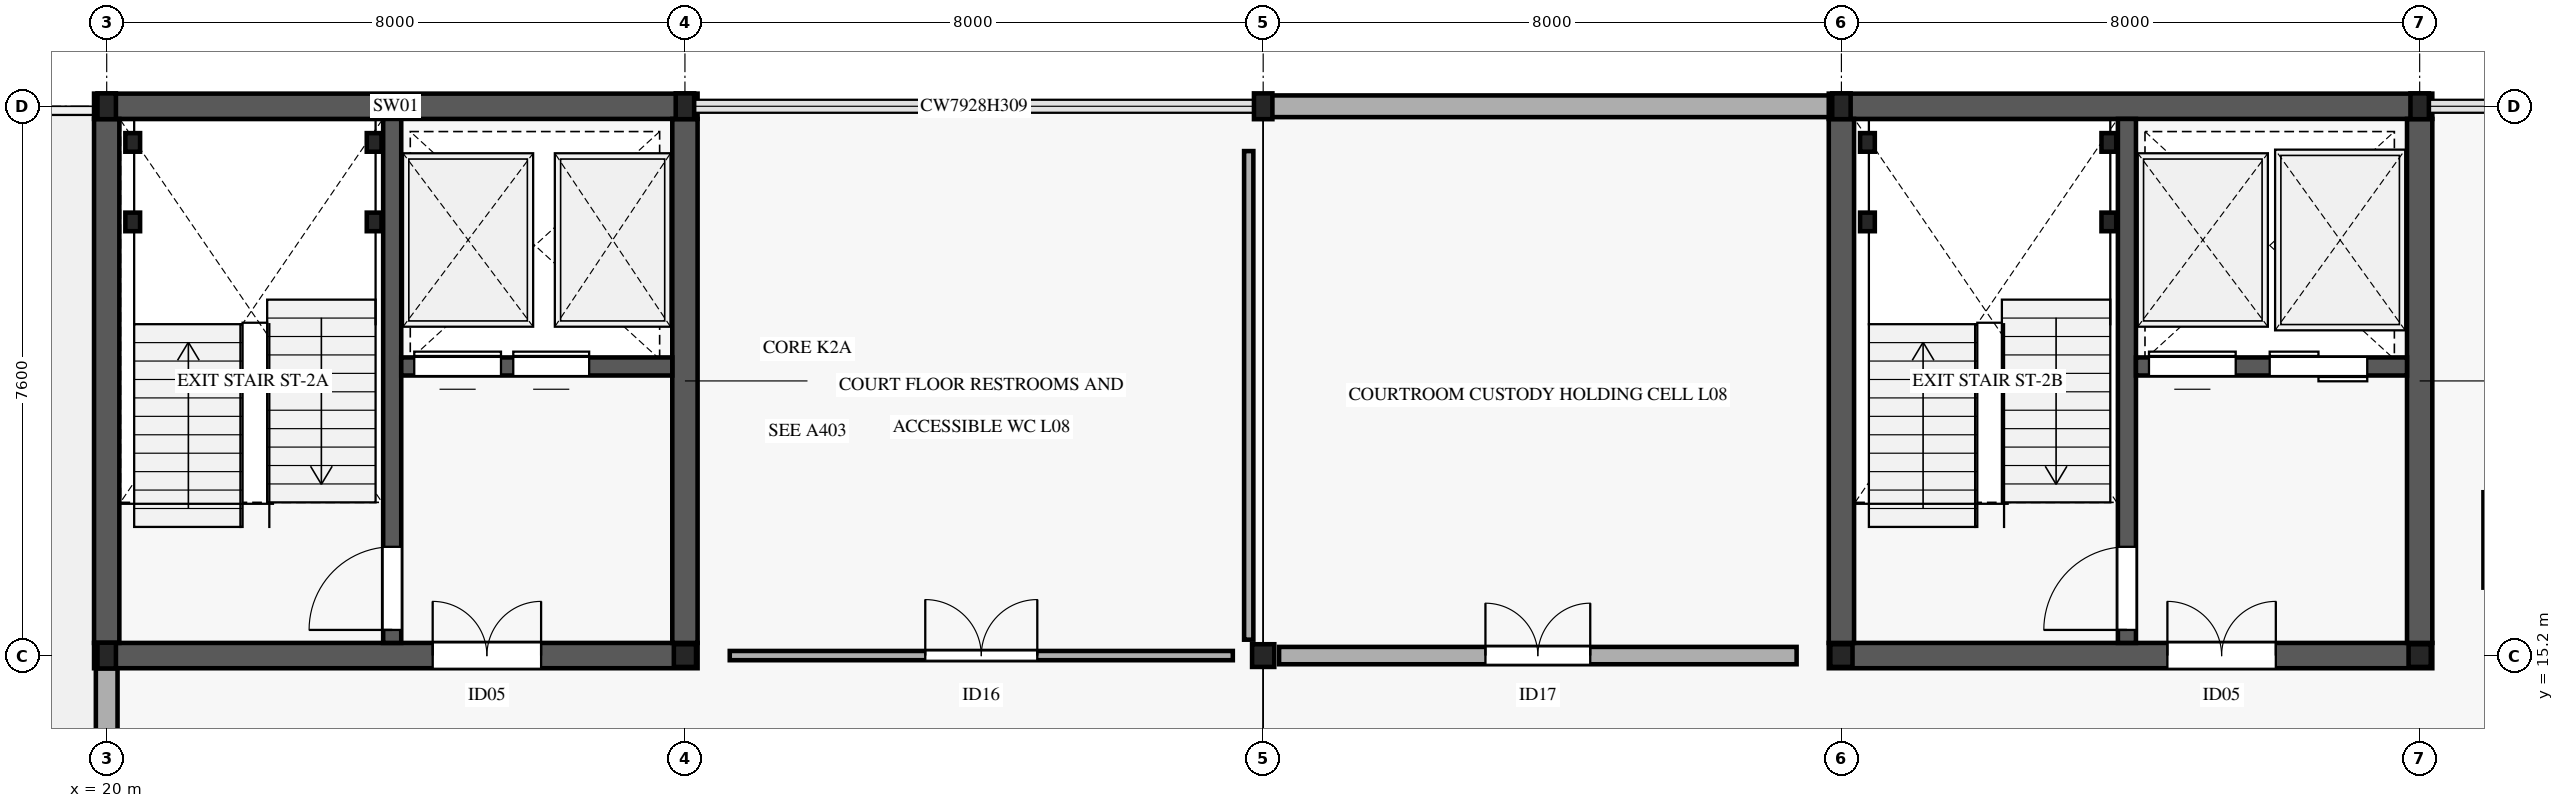
"""IFC4 building model, lengths in metres.
Left out: names, types, materials, properties, quantities, classifications, styles, units other than length and angle.
Written with IfcOpenShell. Run it as: python <this file> out.ifc"""

import sys

from ifc_helpers import new_model, si_unit, direction, frame, frame_2d, origin, origin_2d, place, context, subcontext, project, spatial, rectangle, i_section, extrude, element, fill, save


model = new_model("IFC4")
c1 = context("Model", 3, precision=1e-05, world=origin(), true_north=direction((0.0, 1.0)))
c2 = subcontext(c1, "Body", "Model", "MODEL_VIEW")
j1 = project(units=[si_unit("LENGTHUNIT", "METRE"), si_unit("PLANEANGLEUNIT", "RADIAN")], contexts=[c1])
p1 = place(None, origin())
s1 = spatial("IfcSite", under=j1, at=p1, CompositionType="ELEMENT")
p2 = place(p1, origin())
s2 = spatial("IfcBuilding", under=s1, at=p2, CompositionType="ELEMENT")
p3 = place(p2, frame((0.0, 0.0, 37.8)))
s3 = spatial("IfcBuildingStorey", under=s2, at=p3, CompositionType="ELEMENT", Elevation=37.8)
for number, where, z_axis, x_axis in (
    (1, (20.0, 15.2, 0.0), (0.0, 0.0, 1.0), (1.0, 0.0, 0.0)),
    (2, (20.0, 22.8, 0.0), (0.0, 0.0, 1.0), (1.0, 0.0, 0.0)),
):
    element("IfcColumn", number, at=place(p3, frame(where, z_axis=z_axis, x_axis=x_axis)), inside=s3, PredefinedType="COLUMN", context=c2, shape_type="SweptSolid", body=[
        extrude(i_section(OverallWidth=0.255, OverallDepth=0.357, WebThickness=0.01, FlangeThickness=0.018, FilletRadius=0.015, at=origin_2d()), origin(), (0.0, 0.0, 1.0), 4.0),
    ])
p4 = place(p3, frame((28.0, 15.2, 0.0), z_axis=(0.0, 0.0, 1.0), x_axis=(1.0, 0.0, 0.0)))
e3 = element("IfcColumn", 3, at=p4, inside=s3, PredefinedType="COLUMN", context=c2, shape_type="SweptSolid", body=[
    extrude(i_section(OverallWidth=0.307, OverallDepth=0.314, WebThickness=0.012, FlangeThickness=0.019, FilletRadius=0.015, at=origin_2d()), origin(), (0.0, 0.0, 1.0), 4.0),
])
p5 = place(p3, frame((28.0, 22.8, 0.0), z_axis=(0.0, 0.0, 1.0), x_axis=(1.0, 0.0, 0.0)))
e4 = element("IfcColumn", 4, at=p5, inside=s3, PredefinedType="COLUMN", context=c2, shape_type="SweptSolid", body=[
    extrude(i_section(OverallWidth=0.255, OverallDepth=0.357, WebThickness=0.01, FlangeThickness=0.018, FilletRadius=0.015, at=origin_2d()), origin(), (0.0, 0.0, 1.0), 4.0),
])
p6 = place(p3, frame((36.0, 15.2, 0.0), z_axis=(0.0, 0.0, 1.0), x_axis=(1.0, 0.0, 0.0)))
e5 = element("IfcColumn", 5, at=p6, inside=s3, PredefinedType="COLUMN", context=c2, shape_type="SweptSolid", body=[
    extrude(i_section(OverallWidth=0.307, OverallDepth=0.314, WebThickness=0.012, FlangeThickness=0.019, FilletRadius=0.015, at=origin_2d()), origin(), (0.0, 0.0, 1.0), 4.0),
])
p7 = place(p3, frame((36.0, 22.8, 0.0), z_axis=(0.0, 0.0, 1.0), x_axis=(1.0, 0.0, 0.0)))
e6 = element("IfcColumn", 6, at=p7, inside=s3, PredefinedType="COLUMN", context=c2, shape_type="SweptSolid", body=[
    extrude(i_section(OverallWidth=0.255, OverallDepth=0.357, WebThickness=0.01, FlangeThickness=0.018, FilletRadius=0.015, at=origin_2d()), origin(), (0.0, 0.0, 1.0), 4.0),
])
p8 = place(p3, frame((44.0, 15.2, 0.0), z_axis=(0.0, 0.0, 1.0), x_axis=(1.0, 0.0, 0.0)))
e7 = element("IfcColumn", 7, at=p8, inside=s3, PredefinedType="COLUMN", context=c2, shape_type="SweptSolid", body=[
    extrude(i_section(OverallWidth=0.307, OverallDepth=0.314, WebThickness=0.012, FlangeThickness=0.019, FilletRadius=0.015, at=origin_2d()), origin(), (0.0, 0.0, 1.0), 4.0),
])
p9 = place(p3, frame((44.0, 22.8, 0.0), z_axis=(0.0, 0.0, 1.0), x_axis=(1.0, 0.0, 0.0)))
e8 = element("IfcColumn", 8, at=p9, inside=s3, PredefinedType="COLUMN", context=c2, shape_type="SweptSolid", body=[
    extrude(i_section(OverallWidth=0.255, OverallDepth=0.357, WebThickness=0.01, FlangeThickness=0.018, FilletRadius=0.015, at=origin_2d()), origin(), (0.0, 0.0, 1.0), 4.0),
])
p10 = place(p3, frame((52.0, 15.2, 0.0), z_axis=(0.0, 0.0, 1.0), x_axis=(1.0, 0.0, 0.0)))
e9 = element("IfcColumn", 9, at=p10, inside=s3, PredefinedType="COLUMN", context=c2, shape_type="SweptSolid", body=[
    extrude(i_section(OverallWidth=0.307, OverallDepth=0.314, WebThickness=0.012, FlangeThickness=0.019, FilletRadius=0.015, at=origin_2d()), origin(), (0.0, 0.0, 1.0), 4.0),
])
p11 = place(p3, frame((52.0, 22.8, 0.0), z_axis=(0.0, 0.0, 1.0), x_axis=(1.0, 0.0, 0.0)))
e10 = element("IfcColumn", 10, at=p11, inside=s3, PredefinedType="COLUMN", context=c2, shape_type="SweptSolid", body=[
    extrude(i_section(OverallWidth=0.255, OverallDepth=0.357, WebThickness=0.01, FlangeThickness=0.018, FilletRadius=0.015, at=origin_2d()), origin(), (0.0, 0.0, 1.0), 4.0),
])
p12 = place(p3, frame((20.0, 7.58, 0.0), z_axis=(0.0, 0.0, 1.0), x_axis=(0.0, 1.0, 0.0)))
e11 = element("IfcWall", 11, at=p12, inside=s3, PredefinedType="STANDARD", context=c2, shape_type="SweptSolid", body=[
    extrude(rectangle(XDim=7.64, YDim=0.3, at=frame_2d((3.82, 0.0))), origin(), (0.0, 0.0, 1.0), 3.06),
])
p13 = place(p12, frame((2.195, 0.0, 0.75)))
e12 = element("IfcOpeningElement", 12, at=p13, cuts=e11, PredefinedType="OPENING", context=c2, shape_type="SweptSolid", body=[
    extrude(rectangle(XDim=3.25, YDim=1.55, at=frame_2d((1.625, 0.775))), frame((0.0, 0.16, 0.0), z_axis=(0.0, -1.0, 0.0), x_axis=(1.0, 0.0, 0.0)), (0.0, 0.0, 1.0), 0.32),
])
p14 = place(p3, frame((35.98, 22.8, 0.0), z_axis=(0.0, 0.0, 1.0), x_axis=(1.0, 0.0, 0.0)))
e13 = element("IfcWall", 13, at=p14, inside=s3, PredefinedType="STANDARD", context=c2, shape_type="SweptSolid", body=[
    extrude(rectangle(XDim=8.04, YDim=0.3, at=frame_2d((4.02, 0.0))), origin(), (0.0, 0.0, 1.0), 3.06),
])
p15 = place(p3, frame((52.94, 17.46, 0.0), z_axis=(0.0, 0.0, 1.0), x_axis=(0.0, -1.0, 0.0)))
e14 = element("IfcWall", 14, at=p15, inside=s3, PredefinedType="PARTITIONING", context=c2, shape_type="SweptSolid", body=[
    extrude(rectangle(XDim=1.32, YDim=0.115, at=frame_2d((0.66, 0.0))), origin(), (0.0, 0.0, 1.0), 3.15),
])
p16 = place(p3, frame((19.825, 15.2, 0.0), z_axis=(0.0, 0.0, 1.0), x_axis=(1.0, 0.0, 0.0)))
e15 = element("IfcWall", 15, at=p16, inside=s3, PredefinedType="SHEAR", context=c2, shape_type="SweptSolid", body=[
    extrude(rectangle(XDim=8.35, YDim=0.35, at=frame_2d((4.175, 0.0))), origin(), (0.0, 0.0, 1.0), 3.99),
])
p17 = place(p16, frame((4.685, 0.0, 0.0)))
e16 = element("IfcOpeningElement", 16, at=p17, cuts=e15, PredefinedType="OPENING", context=c2, shape_type="SweptSolid", body=[
    extrude(rectangle(XDim=1.5, YDim=2.2, at=frame_2d((0.75, 1.1))), frame((0.0, 0.185, 0.0), z_axis=(0.0, -1.0, 0.0), x_axis=(1.0, 0.0, 0.0)), (0.0, 0.0, 1.0), 0.37),
])
p18 = place(p3, frame((19.825, 22.8, 0.0), z_axis=(0.0, 0.0, 1.0), x_axis=(1.0, 0.0, 0.0)))
e17 = element("IfcWall", 17, at=p18, inside=s3, PredefinedType="SHEAR", context=c2, shape_type="SweptSolid", body=[
    extrude(rectangle(XDim=8.35, YDim=0.35, at=frame_2d((4.175, 0.0))), origin(), (0.0, 0.0, 1.0), 3.99),
])
for number, where, z_axis, x_axis in (
    (18, (20.0, 15.375, 0.0), (0.0, 0.0, 1.0), (0.0, 1.0, 0.0)),
    (19, (28.0, 15.375, 0.0), (0.0, 0.0, 1.0), (0.0, 1.0, 0.0)),
):
    element("IfcWall", number, at=place(p3, frame(where, z_axis=z_axis, x_axis=x_axis)), inside=s3, PredefinedType="SHEAR", context=c2, shape_type="SweptSolid", body=[
        extrude(rectangle(XDim=7.25, YDim=0.35, at=frame_2d((3.625, 0.0))), origin(), (0.0, 0.0, 1.0), 3.99),
    ])
p19 = place(p3, frame((23.95, 15.375, 0.0), z_axis=(0.0, 0.0, 1.0), x_axis=(0.0, 1.0, 0.0)))
e20 = element("IfcWall", 20, at=p19, inside=s3, PredefinedType="SHEAR", context=c2, shape_type="SweptSolid", body=[
    extrude(rectangle(XDim=7.25, YDim=0.25, at=frame_2d((3.625, 0.0))), origin(), (0.0, 0.0, 1.0), 3.99),
])
p20 = place(p19, frame((0.18, 0.0, 0.0)))
e21 = element("IfcOpeningElement", 21, at=p20, cuts=e20, PredefinedType="OPENING", context=c2, shape_type="SweptSolid", body=[
    extrude(rectangle(XDim=1.15, YDim=2.2, at=frame_2d((0.575, 1.1))), frame((0.0, 0.135, 0.0), z_axis=(0.0, -1.0, 0.0), x_axis=(1.0, 0.0, 0.0)), (0.0, 0.0, 1.0), 0.27),
])
p21 = place(p3, frame((24.075, 19.2, 0.0), z_axis=(0.0, 0.0, 1.0), x_axis=(1.0, 0.0, 0.0)))
e22 = element("IfcWall", 22, at=p21, inside=s3, PredefinedType="SHEAR", context=c2, shape_type="SweptSolid", body=[
    extrude(rectangle(XDim=3.75, YDim=0.25, at=frame_2d((1.875, 0.0))), origin(), (0.0, 0.0, 1.0), 3.99),
])
p22 = place(p21, frame((0.18, 0.0, 0.0)))
e23 = element("IfcOpeningElement", 23, at=p22, cuts=e22, PredefinedType="OPENING", context=c2, shape_type="SweptSolid", body=[
    extrude(rectangle(XDim=1.2, YDim=2.2, at=frame_2d((0.6, 1.1))), frame((0.0, 0.135, 0.0), z_axis=(0.0, -1.0, 0.0), x_axis=(1.0, 0.0, 0.0)), (0.0, 0.0, 1.0), 0.27),
])
p23 = place(p21, frame((1.55, 0.0, 0.0)))
e24 = element("IfcOpeningElement", 24, at=p23, cuts=e22, PredefinedType="OPENING", context=c2, shape_type="SweptSolid", body=[
    extrude(rectangle(XDim=1.05, YDim=2.2, at=frame_2d((0.525, 1.1))), frame((0.0, 0.135, 0.0), z_axis=(0.0, -1.0, 0.0), x_axis=(1.0, 0.0, 0.0)), (0.0, 0.0, 1.0), 0.27),
])
for number, where, z_axis, x_axis in (
    (25, (20.36, 21.2, 0.0), (0.0, 0.0, 1.0), (1.0, 0.0, 0.0)),
    (26, (23.7, 21.2, 0.0), (0.0, 0.0, 1.0), (1.0, 0.0, 0.0)),
    (27, (20.36, 22.3, 0.0), (0.0, 0.0, 1.0), (1.0, 0.0, 0.0)),
    (28, (23.7, 22.3, 0.0), (0.0, 0.0, 1.0), (1.0, 0.0, 0.0)),
):
    element("IfcColumn", number, at=place(p3, frame(where, z_axis=z_axis, x_axis=x_axis)), inside=s3, PredefinedType="COLUMN", context=c2, shape_type="SweptSolid", body=[
        extrude(i_section(OverallWidth=0.204, OverallDepth=0.257, WebThickness=0.009, FlangeThickness=0.016, FilletRadius=0.013, at=origin_2d()), origin(), (0.0, 0.0, 1.0), 4.195),
    ])
p24 = place(p3, frame((43.825, 15.2, 0.0), z_axis=(0.0, 0.0, 1.0), x_axis=(1.0, 0.0, 0.0)))
e29 = element("IfcWall", 29, at=p24, inside=s3, PredefinedType="SHEAR", context=c2, shape_type="SweptSolid", body=[
    extrude(rectangle(XDim=8.35, YDim=0.35, at=frame_2d((4.175, 0.0))), origin(), (0.0, 0.0, 1.0), 3.99),
])
p25 = place(p24, frame((4.685, 0.0, 0.0)))
e30 = element("IfcOpeningElement", 30, at=p25, cuts=e29, PredefinedType="OPENING", context=c2, shape_type="SweptSolid", body=[
    extrude(rectangle(XDim=1.5, YDim=2.2, at=frame_2d((0.75, 1.1))), frame((0.0, 0.185, 0.0), z_axis=(0.0, -1.0, 0.0), x_axis=(1.0, 0.0, 0.0)), (0.0, 0.0, 1.0), 0.37),
])
p26 = place(p3, frame((43.825, 22.8, 0.0), z_axis=(0.0, 0.0, 1.0), x_axis=(1.0, 0.0, 0.0)))
e31 = element("IfcWall", 31, at=p26, inside=s3, PredefinedType="SHEAR", context=c2, shape_type="SweptSolid", body=[
    extrude(rectangle(XDim=8.35, YDim=0.35, at=frame_2d((4.175, 0.0))), origin(), (0.0, 0.0, 1.0), 3.99),
])
for number, where, z_axis, x_axis in (
    (32, (44.0, 15.375, 0.0), (0.0, 0.0, 1.0), (0.0, 1.0, 0.0)),
    (33, (52.0, 15.375, 0.0), (0.0, 0.0, 1.0), (0.0, 1.0, 0.0)),
):
    element("IfcWall", number, at=place(p3, frame(where, z_axis=z_axis, x_axis=x_axis)), inside=s3, PredefinedType="SHEAR", context=c2, shape_type="SweptSolid", body=[
        extrude(rectangle(XDim=7.25, YDim=0.35, at=frame_2d((3.625, 0.0))), origin(), (0.0, 0.0, 1.0), 3.99),
    ])
p27 = place(p3, frame((47.95, 15.375, 0.0), z_axis=(0.0, 0.0, 1.0), x_axis=(0.0, 1.0, 0.0)))
e34 = element("IfcWall", 34, at=p27, inside=s3, PredefinedType="SHEAR", context=c2, shape_type="SweptSolid", body=[
    extrude(rectangle(XDim=7.25, YDim=0.25, at=frame_2d((3.625, 0.0))), origin(), (0.0, 0.0, 1.0), 3.99),
])
p28 = place(p27, frame((0.18, 0.0, 0.0)))
e35 = element("IfcOpeningElement", 35, at=p28, cuts=e34, PredefinedType="OPENING", context=c2, shape_type="SweptSolid", body=[
    extrude(rectangle(XDim=1.15, YDim=2.2, at=frame_2d((0.575, 1.1))), frame((0.0, 0.135, 0.0), z_axis=(0.0, -1.0, 0.0), x_axis=(1.0, 0.0, 0.0)), (0.0, 0.0, 1.0), 0.27),
])
p29 = place(p3, frame((48.075, 19.2, 0.0), z_axis=(0.0, 0.0, 1.0), x_axis=(1.0, 0.0, 0.0)))
e36 = element("IfcWall", 36, at=p29, inside=s3, PredefinedType="SHEAR", context=c2, shape_type="SweptSolid", body=[
    extrude(rectangle(XDim=3.75, YDim=0.25, at=frame_2d((1.875, 0.0))), origin(), (0.0, 0.0, 1.0), 3.99),
])
p30 = place(p29, frame((0.18, 0.0, 0.0)))
e37 = element("IfcOpeningElement", 37, at=p30, cuts=e36, PredefinedType="OPENING", context=c2, shape_type="SweptSolid", body=[
    extrude(rectangle(XDim=1.2, YDim=2.2, at=frame_2d((0.6, 1.1))), frame((0.0, 0.135, 0.0), z_axis=(0.0, -1.0, 0.0), x_axis=(1.0, 0.0, 0.0)), (0.0, 0.0, 1.0), 0.27),
])
p31 = place(p29, frame((1.85, 0.0, 0.0)))
e38 = element("IfcOpeningElement", 38, at=p31, cuts=e36, PredefinedType="OPENING", context=c2, shape_type="SweptSolid", body=[
    extrude(rectangle(XDim=1.35, YDim=2.2, at=frame_2d((0.675, 1.1))), frame((0.0, 0.135, 0.0), z_axis=(0.0, -1.0, 0.0), x_axis=(1.0, 0.0, 0.0)), (0.0, 0.0, 1.0), 0.27),
])
for number, where, z_axis, x_axis in (
    (39, (44.36, 21.2, 0.0), (0.0, 0.0, 1.0), (1.0, 0.0, 0.0)),
    (40, (47.7, 21.2, 0.0), (0.0, 0.0, 1.0), (1.0, 0.0, 0.0)),
    (41, (44.36, 22.3, 0.0), (0.0, 0.0, 1.0), (1.0, 0.0, 0.0)),
    (42, (47.7, 22.3, 0.0), (0.0, 0.0, 1.0), (1.0, 0.0, 0.0)),
):
    element("IfcColumn", number, at=place(p3, frame(where, z_axis=z_axis, x_axis=x_axis)), inside=s3, PredefinedType="COLUMN", context=c2, shape_type="SweptSolid", body=[
        extrude(i_section(OverallWidth=0.204, OverallDepth=0.257, WebThickness=0.009, FlangeThickness=0.016, FilletRadius=0.013, at=origin_2d()), origin(), (0.0, 0.0, 1.0), 4.195),
    ])
p32 = place(p3, frame((28.62, 15.2, 0.0), z_axis=(0.0, 0.0, 1.0), x_axis=(1.0, 0.0, 0.0)))
e43 = element("IfcWall", 43, at=p32, inside=s3, PredefinedType="PARTITIONING", context=c2, shape_type="SweptSolid", body=[
    extrude(rectangle(XDim=6.96, YDim=0.128, at=frame_2d((3.48, 0.0))), origin(), (0.0, 0.0, 1.0), 2.85),
])
p33 = place(p32, frame((2.705, 0.0, 0.0)))
e44 = element("IfcOpeningElement", 44, at=p33, cuts=e43, PredefinedType="OPENING", context=c2, shape_type="SweptSolid", body=[
    extrude(rectangle(XDim=1.55, YDim=2.3, at=frame_2d((0.775, 1.15))), frame((0.0, 0.074, 0.0), z_axis=(0.0, -1.0, 0.0), x_axis=(1.0, 0.0, 0.0)), (0.0, 0.0, 1.0), 0.148),
])
p34 = place(p3, frame((35.8, 15.42, 0.0), z_axis=(0.0, 0.0, 1.0), x_axis=(0.0, 1.0, 0.0)))
e45 = element("IfcWall", 45, at=p34, inside=s3, PredefinedType="PARTITIONING", context=c2, shape_type="SweptSolid", body=[
    extrude(rectangle(XDim=6.76, YDim=0.128, at=frame_2d((3.38, 0.0))), origin(), (0.0, 0.0, 1.0), 2.85),
])
p35 = place(p3, frame((36.22, 15.2, 0.0), z_axis=(0.0, 0.0, 1.0), x_axis=(1.0, 0.0, 0.0)))
e46 = element("IfcWall", 46, at=p35, inside=s3, PredefinedType="PARTITIONING", context=c2, shape_type="SweptSolid", body=[
    extrude(rectangle(XDim=7.16, YDim=0.24, at=frame_2d((3.58, 0.0))), origin(), (0.0, 0.0, 1.0), 2.85),
])
p36 = place(p35, frame((2.855, 0.0, 0.0)))
e47 = element("IfcOpeningElement", 47, at=p36, cuts=e46, PredefinedType="OPENING", context=c2, shape_type="SweptSolid", body=[
    extrude(rectangle(XDim=1.45, YDim=2.25, at=frame_2d((0.725, 1.125))), frame((0.0, 0.13, 0.0), z_axis=(0.0, -1.0, 0.0), x_axis=(1.0, 0.0, 0.0)), (0.0, 0.0, 1.0), 0.26),
])
p37 = place(p20, origin())
e48 = element("IfcDoor", 48, at=p37, inside=s3, OperationType="SINGLE_SWING_LEFT", PredefinedType="DOOR", context=c2, shape_type="SweptSolid", body=[
    extrude(rectangle(XDim=1.15, YDim=2.2, at=frame_2d((0.575, 1.1))), frame((0.0, 0.025, 0.0), z_axis=(0.0, -1.0, 0.0), x_axis=(1.0, 0.0, 0.0)), (0.0, 0.0, 1.0), 0.05),
])
fill(e21, e48)
p38 = place(p17, origin())
e49 = element("IfcDoor", 49, at=p38, inside=s3, OperationType="DOUBLE_DOOR_SINGLE_SWING", PredefinedType="DOOR", context=c2, shape_type="SweptSolid", body=[
    extrude(rectangle(XDim=1.5, YDim=2.2, at=frame_2d((0.75, 1.1))), frame((0.0, 0.025, 0.0), z_axis=(0.0, -1.0, 0.0), x_axis=(1.0, 0.0, 0.0)), (0.0, 0.0, 1.0), 0.05),
])
fill(e16, e49)
p39 = place(p22, origin())
e50 = element("IfcDoor", 50, at=p39, inside=s3, OperationType="SLIDING_TO_LEFT", PredefinedType="DOOR", context=c2, shape_type="SweptSolid", body=[
    extrude(rectangle(XDim=1.2, YDim=2.2, at=frame_2d((0.6, 1.1))), frame((0.0, 0.025, 0.0), z_axis=(0.0, -1.0, 0.0), x_axis=(1.0, 0.0, 0.0)), (0.0, 0.0, 1.0), 0.05),
])
fill(e23, e50)
p40 = place(p23, origin())
e51 = element("IfcDoor", 51, at=p40, inside=s3, OperationType="SLIDING_TO_RIGHT", PredefinedType="DOOR", context=c2, shape_type="SweptSolid", body=[
    extrude(rectangle(XDim=1.05, YDim=2.2, at=frame_2d((0.525, 1.1))), frame((0.0, 0.025, 0.0), z_axis=(0.0, -1.0, 0.0), x_axis=(1.0, 0.0, 0.0)), (0.0, 0.0, 1.0), 0.05),
])
fill(e24, e51)
p41 = place(p28, origin())
e52 = element("IfcDoor", 52, at=p41, inside=s3, OperationType="SINGLE_SWING_LEFT", PredefinedType="DOOR", context=c2, shape_type="SweptSolid", body=[
    extrude(rectangle(XDim=1.15, YDim=2.2, at=frame_2d((0.575, 1.1))), frame((0.0, 0.025, 0.0), z_axis=(0.0, -1.0, 0.0), x_axis=(1.0, 0.0, 0.0)), (0.0, 0.0, 1.0), 0.05),
])
fill(e35, e52)
p42 = place(p25, origin())
e53 = element("IfcDoor", 53, at=p42, inside=s3, OperationType="DOUBLE_DOOR_SINGLE_SWING", PredefinedType="DOOR", context=c2, shape_type="SweptSolid", body=[
    extrude(rectangle(XDim=1.5, YDim=2.2, at=frame_2d((0.75, 1.1))), frame((0.0, 0.025, 0.0), z_axis=(0.0, -1.0, 0.0), x_axis=(1.0, 0.0, 0.0)), (0.0, 0.0, 1.0), 0.05),
])
fill(e30, e53)
p43 = place(p30, origin())
e54 = element("IfcDoor", 54, at=p43, inside=s3, OperationType="SLIDING_TO_LEFT", PredefinedType="DOOR", context=c2, shape_type="SweptSolid", body=[
    extrude(rectangle(XDim=1.2, YDim=2.2, at=frame_2d((0.6, 1.1))), frame((0.0, 0.025, 0.0), z_axis=(0.0, -1.0, 0.0), x_axis=(1.0, 0.0, 0.0)), (0.0, 0.0, 1.0), 0.05),
])
fill(e37, e54)
p44 = place(p31, origin())
e55 = element("IfcDoor", 55, at=p44, inside=s3, OperationType="DOUBLE_DOOR_SLIDING", PredefinedType="DOOR", context=c2, shape_type="SweptSolid", body=[
    extrude(rectangle(XDim=1.35, YDim=2.2, at=frame_2d((0.675, 1.1))), frame((0.0, 0.025, 0.0), z_axis=(0.0, -1.0, 0.0), x_axis=(1.0, 0.0, 0.0)), (0.0, 0.0, 1.0), 0.05),
])
fill(e38, e55)
p45 = place(p33, origin())
e56 = element("IfcDoor", 56, at=p45, inside=s3, OperationType="DOUBLE_DOOR_SINGLE_SWING", PredefinedType="DOOR", context=c2, shape_type="SweptSolid", body=[
    extrude(rectangle(XDim=1.55, YDim=2.3, at=frame_2d((0.775, 1.15))), frame((0.0, 0.025, 0.0), z_axis=(0.0, -1.0, 0.0), x_axis=(1.0, 0.0, 0.0)), (0.0, 0.0, 1.0), 0.05),
])
fill(e44, e56)
p46 = place(p36, origin())
e57 = element("IfcDoor", 57, at=p46, inside=s3, OperationType="DOUBLE_DOOR_SINGLE_SWING", PredefinedType="DOOR", context=c2, shape_type="SweptSolid", body=[
    extrude(rectangle(XDim=1.45, YDim=2.25, at=frame_2d((0.725, 1.125))), frame((0.0, 0.025, 0.0), z_axis=(0.0, -1.0, 0.0), x_axis=(1.0, 0.0, 0.0)), (0.0, 0.0, 1.0), 0.05),
])
fill(e47, e57)
save(model, sys.argv[1])
